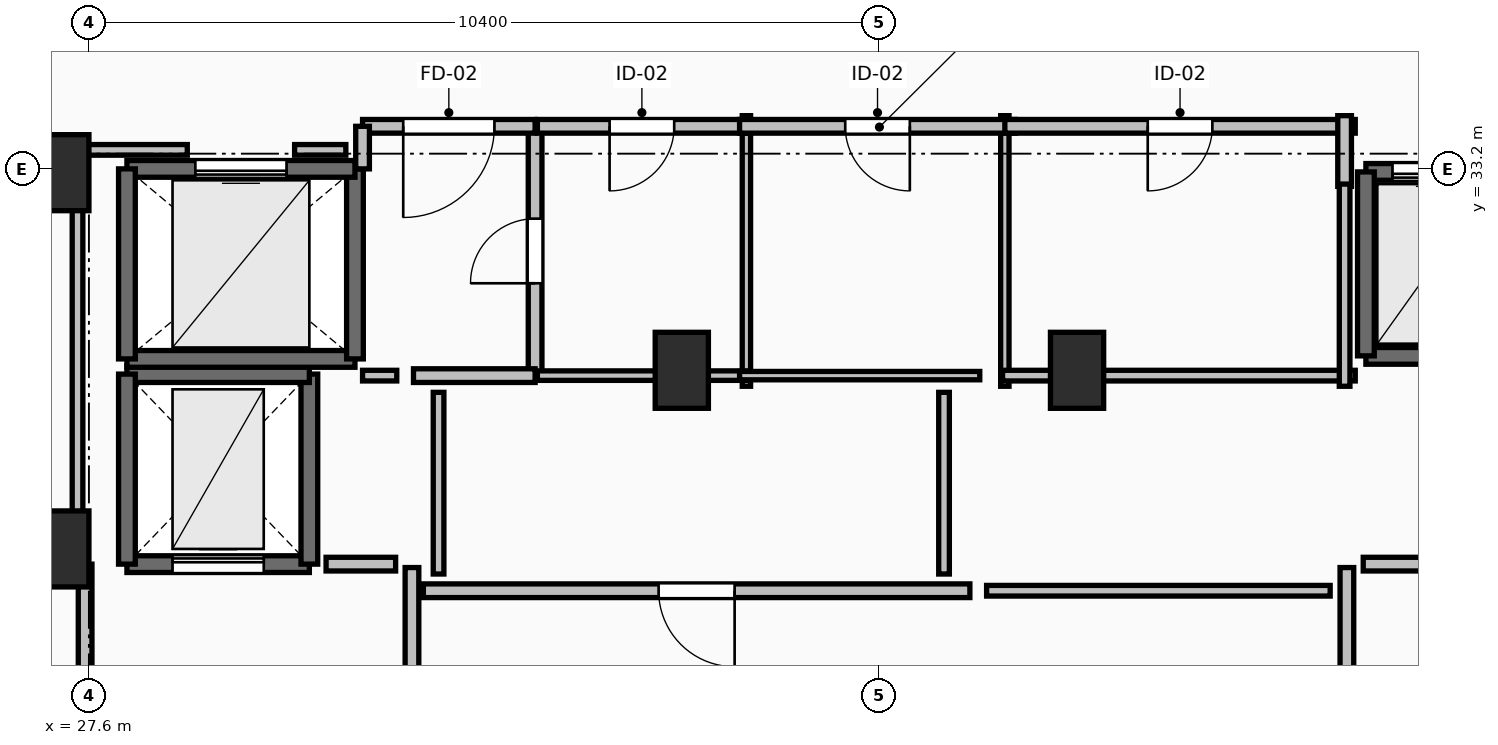
"""IFC4 building model, lengths in metres.
Left out: names, types, materials, properties, quantities, classifications, styles, units other than length and angle.
Written with IfcOpenShell. Run it as: python <this file> out.ifc"""

import sys

from ifc_helpers import new_model, si_unit, direction, frame, frame_2d, origin, origin_2d, place, context, subcontext, project, spatial, rectangle, extrude, element, fill, save


model = new_model("IFC4")
c1 = context("Model", 3, precision=1e-05, world=origin(), true_north=direction((0.0, 1.0)))
c2 = subcontext(c1, "Body", "Model", "MODEL_VIEW")
j1 = project(units=[si_unit("LENGTHUNIT", "METRE"), si_unit("PLANEANGLEUNIT", "RADIAN")], contexts=[c1])
p1 = place(None, origin())
s1 = spatial("IfcSite", under=j1, at=p1, CompositionType="ELEMENT")
p2 = place(p1, origin())
s2 = spatial("IfcBuilding", under=s1, at=p2, CompositionType="ELEMENT")
p3 = place(p2, frame((0.0, 0.0, 285.4)))
s3 = spatial("IfcBuildingStorey", under=s2, at=p3, CompositionType="ELEMENT", Elevation=285.4)
for number, where, z_axis, x_axis in (
    (1, (27.25, 28.2, 0.0), (0.0, 0.0, 1.0), (1.0, 0.0, 0.0)),
    (2, (27.25, 33.15, 0.0), (0.0, 0.0, 1.0), (1.0, 0.0, 0.0)),
    (3, (35.4, 30.55, 0.0), (0.0, 0.0, 1.0), (1.0, 0.0, 0.0)),
    (4, (40.6, 30.55, 0.0), (0.0, 0.0, 1.0), (1.0, 0.0, 0.0)),
):
    element("IfcColumn", number, at=place(p3, frame(where, z_axis=z_axis, x_axis=x_axis)), inside=s3, PredefinedType="PILASTER", context=c2, shape_type="SweptSolid", body=[
        extrude(rectangle(XDim=0.7, YDim=1.0, at=origin_2d()), origin(), (0.0, 0.0, 1.0), 5.0),
    ])
p4 = place(p3, frame((44.4, 30.74, 0.0), z_axis=(0.0, 0.0, 1.0), x_axis=(1.0, 0.0, 0.0)))
e5 = element("IfcWall", 5, at=p4, inside=s3, PredefinedType="SOLIDWALL", context=c2, shape_type="SweptSolid", body=[
    extrude(rectangle(XDim=1.8, YDim=0.22, at=frame_2d((0.9, 0.0))), origin(), (0.0, 0.0, 1.0), 4.69),
])
p5 = place(p3, frame((46.2, 33.16, 0.0), z_axis=(0.0, 0.0, 1.0), x_axis=(-1.0, 0.0, 0.0)))
e6 = element("IfcWall", 6, at=p5, inside=s3, PredefinedType="SOLIDWALL", context=c2, shape_type="SweptSolid", body=[
    extrude(rectangle(XDim=1.8, YDim=0.22, at=frame_2d((0.9, 0.0))), origin(), (0.0, 0.0, 1.0), 4.69),
])
p6 = place(p5, frame((0.35, 0.0, 0.0)))
e7 = element("IfcOpeningElement", 7, at=p6, cuts=e6, PredefinedType="OPENING", context=c2, shape_type="SweptSolid", body=[
    extrude(rectangle(XDim=1.1, YDim=2.2, at=frame_2d((0.55, 1.1))), frame((0.0, 0.125, 0.0), z_axis=(0.0, -1.0, 0.0), x_axis=(1.0, 0.0, 0.0)), (0.0, 0.0, 1.0), 0.25),
])
p7 = place(p3, frame((44.4, 33.16, 0.0), z_axis=(0.0, 0.0, 1.0), x_axis=(0.0, -1.0, 0.0)))
e8 = element("IfcWall", 8, at=p7, inside=s3, PredefinedType="SOLIDWALL", context=c2, shape_type="SweptSolid", body=[
    extrude(rectangle(XDim=2.42, YDim=0.22, at=frame_2d((1.21, 0.0))), origin(), (0.0, 0.0, 1.0), 4.69),
])
p8 = place(p3, frame((28.1, 28.0, 0.0), z_axis=(0.0, 0.0, 1.0), x_axis=(1.0, 0.0, 0.0)))
e9 = element("IfcWall", 9, at=p8, inside=s3, PredefinedType="SHEAR", context=c2, shape_type="SweptSolid", body=[
    extrude(rectangle(XDim=2.4, YDim=0.22, at=frame_2d((1.2, 0.0))), origin(), (0.0, 0.0, 1.0), 4.69),
])
p9 = place(p8, frame((0.6, 0.0, 0.0)))
e10 = element("IfcOpeningElement", 10, at=p9, cuts=e9, PredefinedType="OPENING", context=c2, shape_type="SweptSolid", body=[
    extrude(rectangle(XDim=1.2, YDim=2.2, at=frame_2d((0.6, 1.1))), frame((0.0, 0.125, 0.0), z_axis=(0.0, -1.0, 0.0), x_axis=(1.0, 0.0, 0.0)), (0.0, 0.0, 1.0), 0.25),
])
p10 = place(p3, frame((30.5, 28.0, 0.0), z_axis=(0.0, 0.0, 1.0), x_axis=(0.0, 1.0, 0.0)))
e11 = element("IfcWall", 11, at=p10, inside=s3, PredefinedType="SHEAR", context=c2, shape_type="SweptSolid", body=[
    extrude(rectangle(XDim=2.5, YDim=0.22, at=frame_2d((1.25, 0.0))), origin(), (0.0, 0.0, 1.0), 4.69),
])
p11 = place(p3, frame((30.5, 30.5, 0.0), z_axis=(0.0, 0.0, 1.0), x_axis=(-1.0, 0.0, 0.0)))
e12 = element("IfcWall", 12, at=p11, inside=s3, PredefinedType="SHEAR", context=c2, shape_type="SweptSolid", body=[
    extrude(rectangle(XDim=2.4, YDim=0.22, at=frame_2d((1.2, 0.0))), origin(), (0.0, 0.0, 1.0), 4.69),
])
p12 = place(p3, frame((28.1, 30.5, 0.0), z_axis=(0.0, 0.0, 1.0), x_axis=(0.0, -1.0, 0.0)))
e13 = element("IfcWall", 13, at=p12, inside=s3, PredefinedType="SHEAR", context=c2, shape_type="SweptSolid", body=[
    extrude(rectangle(XDim=2.5, YDim=0.22, at=frame_2d((1.25, 0.0))), origin(), (0.0, 0.0, 1.0), 4.69),
])
p13 = place(p3, frame((28.1, 30.7, 0.0), z_axis=(0.0, 0.0, 1.0), x_axis=(1.0, 0.0, 0.0)))
e14 = element("IfcWall", 14, at=p13, inside=s3, PredefinedType="SOLIDWALL", context=c2, shape_type="SweptSolid", body=[
    extrude(rectangle(XDim=3.0, YDim=0.22, at=frame_2d((1.5, 0.0))), origin(), (0.0, 0.0, 1.0), 4.69),
])
p14 = place(p3, frame((31.1, 30.7, 0.0), z_axis=(0.0, 0.0, 1.0), x_axis=(0.0, 1.0, 0.0)))
e15 = element("IfcWall", 15, at=p14, inside=s3, PredefinedType="SOLIDWALL", context=c2, shape_type="SweptSolid", body=[
    extrude(rectangle(XDim=2.5, YDim=0.22, at=frame_2d((1.25, 0.0))), origin(), (0.0, 0.0, 1.0), 4.69),
])
p15 = place(p3, frame((31.1, 33.2, 0.0), z_axis=(0.0, 0.0, 1.0), x_axis=(-1.0, 0.0, 0.0)))
e16 = element("IfcWall", 16, at=p15, inside=s3, PredefinedType="SOLIDWALL", context=c2, shape_type="SweptSolid", body=[
    extrude(rectangle(XDim=3.0, YDim=0.22, at=frame_2d((1.5, 0.0))), origin(), (0.0, 0.0, 1.0), 4.69),
])
p16 = place(p15, frame((0.9, 0.0, 0.0)))
e17 = element("IfcOpeningElement", 17, at=p16, cuts=e16, PredefinedType="OPENING", context=c2, shape_type="SweptSolid", body=[
    extrude(rectangle(XDim=1.2, YDim=2.2, at=frame_2d((0.6, 1.1))), frame((0.0, 0.125, 0.0), z_axis=(0.0, -1.0, 0.0), x_axis=(1.0, 0.0, 0.0)), (0.0, 0.0, 1.0), 0.25),
])
p17 = place(p3, frame((28.1, 33.2, 0.0), z_axis=(0.0, 0.0, 1.0), x_axis=(0.0, -1.0, 0.0)))
e18 = element("IfcWall", 18, at=p17, inside=s3, PredefinedType="SOLIDWALL", context=c2, shape_type="SweptSolid", body=[
    extrude(rectangle(XDim=2.5, YDim=0.22, at=frame_2d((1.25, 0.0))), origin(), (0.0, 0.0, 1.0), 4.69),
])
p18 = place(p3, frame((31.85, 24.045, 0.0), z_axis=(0.0, 0.0, 1.0), x_axis=(0.0, 1.0, 0.0)))
e19 = element("IfcWall", 19, at=p18, inside=s3, PredefinedType="PARTITIONING", context=c2, shape_type="SweptSolid", body=[
    extrude(rectangle(XDim=3.91, YDim=0.18, at=frame_2d((1.955, 0.0))), origin(), (0.0, 0.0, 1.0), 4.69),
])
p19 = place(p18, frame((1.355, 0.0, 0.0)))
e20 = element("IfcOpeningElement", 20, at=p19, cuts=e19, PredefinedType="OPENING", context=c2, shape_type="SweptSolid", body=[
    extrude(rectangle(XDim=1.2, YDim=2.15, at=frame_2d((0.6, 1.075))), frame((0.0, 0.105, 0.0), z_axis=(0.0, -1.0, 0.0), x_axis=(1.0, 0.0, 0.0)), (0.0, 0.0, 1.0), 0.21),
])
p20 = place(p3, frame((27.55, 28.0, 0.0), z_axis=(0.0, 0.0, 1.0), x_axis=(0.0, -1.0, 0.0)))
e21 = element("IfcWall", 21, at=p20, inside=s3, PredefinedType="PARTITIONING", context=c2, shape_type="SweptSolid", body=[
    extrude(rectangle(XDim=4.05, YDim=0.18, at=frame_2d((2.025, 0.0))), origin(), (0.0, 0.0, 1.0), 4.69),
])
p21 = place(p20, frame((1.425, 0.0, 0.0)))
e22 = element("IfcOpeningElement", 22, at=p21, cuts=e21, PredefinedType="OPENING", context=c2, shape_type="SweptSolid", body=[
    extrude(rectangle(XDim=1.2, YDim=2.15, at=frame_2d((0.6, 1.075))), frame((0.0, 0.105, 0.0), z_axis=(0.0, -1.0, 0.0), x_axis=(1.0, 0.0, 0.0)), (0.0, 0.0, 1.0), 0.21),
])
p22 = place(p3, frame((44.15, 27.955, 0.0), z_axis=(0.0, 0.0, 1.0), x_axis=(0.0, -1.0, 0.0)))
e23 = element("IfcWall", 23, at=p22, inside=s3, PredefinedType="PARTITIONING", context=c2, shape_type="SweptSolid", body=[
    extrude(rectangle(XDim=3.91, YDim=0.18, at=frame_2d((1.955, 0.0))), origin(), (0.0, 0.0, 1.0), 4.69),
])
p23 = place(p22, frame((1.355, 0.0, 0.0)))
e24 = element("IfcOpeningElement", 24, at=p23, cuts=e23, PredefinedType="OPENING", context=c2, shape_type="SweptSolid", body=[
    extrude(rectangle(XDim=1.2, YDim=2.15, at=frame_2d((0.6, 1.075))), frame((0.0, 0.105, 0.0), z_axis=(0.0, -1.0, 0.0), x_axis=(1.0, 0.0, 0.0)), (0.0, 0.0, 1.0), 0.21),
])
p24 = place(p3, frame((33.47, 30.48, 0.0), z_axis=(0.0, 0.0, 1.0), x_axis=(0.0, 1.0, 0.0)))
e25 = element("IfcWall", 25, at=p24, inside=s3, PredefinedType="PARTITIONING", context=c2, shape_type="SweptSolid", body=[
    extrude(rectangle(XDim=3.28, YDim=0.18, at=frame_2d((1.64, 0.0))), origin(), (0.0, 0.0, 1.0), 4.69),
])
p25 = place(p24, frame((1.215, 0.0, 0.0)))
e26 = element("IfcOpeningElement", 26, at=p25, cuts=e25, PredefinedType="OPENING", context=c2, shape_type="SweptSolid", body=[
    extrude(rectangle(XDim=0.85, YDim=2.1, at=frame_2d((0.425, 1.05))), frame((0.0, 0.105, 0.0), z_axis=(0.0, -1.0, 0.0), x_axis=(1.0, 0.0, 0.0)), (0.0, 0.0, 1.0), 0.21),
])
p26 = place(p3, frame((31.87, 30.48, 0.0), z_axis=(0.0, 0.0, 1.0), x_axis=(1.0, 0.0, 0.0)))
e27 = element("IfcWall", 27, at=p26, inside=s3, PredefinedType="PARTITIONING", context=c2, shape_type="SweptSolid", body=[
    extrude(rectangle(XDim=1.6, YDim=0.18, at=frame_2d((0.8, 0.0))), origin(), (0.0, 0.0, 1.0), 4.69),
])
p27 = place(p3, frame((33.47, 33.76, 0.0), z_axis=(0.0, 0.0, 1.0), x_axis=(-1.0, 0.0, 0.0)))
e28 = element("IfcWall", 28, at=p27, inside=s3, PredefinedType="PARTITIONING", context=c2, shape_type="SweptSolid", body=[
    extrude(rectangle(XDim=2.27, YDim=0.18, at=frame_2d((1.135, 0.0))), origin(), (0.0, 0.0, 1.0), 4.69),
])
p28 = place(p27, frame((0.535, 0.0, 0.0)))
e29 = element("IfcOpeningElement", 29, at=p28, cuts=e28, PredefinedType="OPENING", context=c2, shape_type="SweptSolid", body=[
    extrude(rectangle(XDim=1.2, YDim=2.15, at=frame_2d((0.6, 1.075))), frame((0.0, 0.105, 0.0), z_axis=(0.0, -1.0, 0.0), x_axis=(1.0, 0.0, 0.0)), (0.0, 0.0, 1.0), 0.21),
])
p29 = place(p3, frame((31.2, 33.76, 0.0), z_axis=(0.0, 0.0, 1.0), x_axis=(0.0, -1.0, 0.0)))
e30 = element("IfcWall", 30, at=p29, inside=s3, PredefinedType="PARTITIONING", context=c2, shape_type="SweptSolid", body=[
    extrude(rectangle(XDim=0.56, YDim=0.18, at=frame_2d((0.28, 0.0))), origin(), (0.0, 0.0, 1.0), 4.69),
])
p30 = place(p3, frame((39.19, 27.65, 0.0), z_axis=(0.0, 0.0, 1.0), x_axis=(-1.0, 0.0, 0.0)))
e31 = element("IfcWall", 31, at=p30, inside=s3, PredefinedType="PARTITIONING", context=c2, shape_type="SweptSolid", body=[
    extrude(rectangle(XDim=7.19, YDim=0.18, at=frame_2d((3.595, 0.0))), origin(), (0.0, 0.0, 1.0), 4.69),
])
p31 = place(p30, frame((3.095, 0.0, 0.0)))
e32 = element("IfcOpeningElement", 32, at=p31, cuts=e31, PredefinedType="OPENING", context=c2, shape_type="SweptSolid", body=[
    extrude(rectangle(XDim=1.0, YDim=2.15, at=frame_2d((0.5, 1.075))), frame((0.0, 0.105, 0.0), z_axis=(0.0, -1.0, 0.0), x_axis=(1.0, 0.0, 0.0)), (0.0, 0.0, 1.0), 0.21),
])
p32 = place(p3, frame((36.25, 30.34, 0.0), z_axis=(0.0, 0.0, 1.0), x_axis=(0.0, 1.0, 0.0)))
e33 = element("IfcWall", 33, at=p32, inside=s3, PredefinedType="PARTITIONING", context=c2, shape_type="SweptSolid", body=[
    extrude(rectangle(XDim=3.56, YDim=0.11, at=frame_2d((1.78, 0.0))), origin(), (0.0, 0.0, 1.0), 3.882),
])
p33 = place(p3, frame((33.5, 30.48, 0.0), z_axis=(0.0, 0.0, 1.0), x_axis=(1.0, 0.0, 0.0)))
e34 = element("IfcWall", 34, at=p33, inside=s3, PredefinedType="PARTITIONING", context=c2, shape_type="SweptSolid", body=[
    extrude(rectangle(XDim=2.75, YDim=0.125, at=frame_2d((1.375, 0.0))), origin(), (0.0, 0.0, 1.0), 3.882),
])
p34 = place(p3, frame((36.25, 33.76, 0.0), z_axis=(0.0, 0.0, 1.0), x_axis=(-1.0, 0.0, 0.0)))
e35 = element("IfcWall", 35, at=p34, inside=s3, PredefinedType="PARTITIONING", context=c2, shape_type="SweptSolid", body=[
    extrude(rectangle(XDim=2.75, YDim=0.18, at=frame_2d((1.375, 0.0))), origin(), (0.0, 0.0, 1.0), 4.69),
])
p35 = place(p34, frame((0.95, 0.0, 0.0)))
e36 = element("IfcOpeningElement", 36, at=p35, cuts=e35, PredefinedType="OPENING", context=c2, shape_type="SweptSolid", body=[
    extrude(rectangle(XDim=0.85, YDim=2.1, at=frame_2d((0.425, 1.05))), frame((0.0, 0.105, 0.0), z_axis=(0.0, -1.0, 0.0), x_axis=(1.0, 0.0, 0.0)), (0.0, 0.0, 1.0), 0.21),
])
p36 = place(p3, frame((39.65, 30.34, 0.0), z_axis=(0.0, 0.0, 1.0), x_axis=(0.0, 1.0, 0.0)))
e37 = element("IfcWall", 37, at=p36, inside=s3, PredefinedType="PARTITIONING", context=c2, shape_type="SweptSolid", body=[
    extrude(rectangle(XDim=3.56, YDim=0.11, at=frame_2d((1.78, 0.0))), origin(), (0.0, 0.0, 1.0), 3.882),
])
p37 = place(p3, frame((36.16, 30.48, 0.0), z_axis=(0.0, 0.0, 1.0), x_axis=(1.0, 0.0, 0.0)))
e38 = element("IfcWall", 38, at=p37, inside=s3, PredefinedType="PARTITIONING", context=c2, shape_type="SweptSolid", body=[
    extrude(rectangle(XDim=3.16, YDim=0.11, at=frame_2d((1.58, 0.0))), origin(), (0.0, 0.0, 1.0), 3.882),
])
p38 = place(p3, frame((39.79, 33.76, 0.0), z_axis=(0.0, 0.0, 1.0), x_axis=(-1.0, 0.0, 0.0)))
e39 = element("IfcWall", 39, at=p38, inside=s3, PredefinedType="PARTITIONING", context=c2, shape_type="SweptSolid", body=[
    extrude(rectangle(XDim=3.63, YDim=0.18, at=frame_2d((1.815, 0.0))), origin(), (0.0, 0.0, 1.0), 4.69),
])
p39 = place(p38, frame((1.39, 0.0, 0.0)))
e40 = element("IfcOpeningElement", 40, at=p39, cuts=e39, PredefinedType="OPENING", context=c2, shape_type="SweptSolid", body=[
    extrude(rectangle(XDim=0.85, YDim=2.1, at=frame_2d((0.425, 1.05))), frame((0.0, 0.105, 0.0), z_axis=(0.0, -1.0, 0.0), x_axis=(1.0, 0.0, 0.0)), (0.0, 0.0, 1.0), 0.21),
])
p40 = place(p3, frame((44.26, 33.76, 0.0), z_axis=(0.0, 0.0, 1.0), x_axis=(-1.0, 0.0, 0.0)))
e41 = element("IfcWall", 41, at=p40, inside=s3, PredefinedType="PARTITIONING", context=c2, shape_type="SweptSolid", body=[
    extrude(rectangle(XDim=4.61, YDim=0.18, at=frame_2d((2.305, 0.0))), origin(), (0.0, 0.0, 1.0), 4.69),
])
p41 = place(p40, frame((1.88, 0.0, 0.0)))
e42 = element("IfcOpeningElement", 42, at=p41, cuts=e41, PredefinedType="OPENING", context=c2, shape_type="SweptSolid", body=[
    extrude(rectangle(XDim=0.85, YDim=2.1, at=frame_2d((0.425, 1.05))), frame((0.0, 0.105, 0.0), z_axis=(0.0, -1.0, 0.0), x_axis=(1.0, 0.0, 0.0)), (0.0, 0.0, 1.0), 0.21),
])
p42 = place(p3, frame((44.12, 32.97, 0.0), z_axis=(0.0, 0.0, 1.0), x_axis=(0.0, 1.0, 0.0)))
e43 = element("IfcWall", 43, at=p42, inside=s3, PredefinedType="PARTITIONING", context=c2, shape_type="SweptSolid", body=[
    extrude(rectangle(XDim=0.93, YDim=0.18, at=frame_2d((0.465, 0.0))), origin(), (0.0, 0.0, 1.0), 4.69),
])
for number, where, z_axis, x_axis in (
    (44, (31.635, 28.0, 0.0), (0.0, 0.0, 1.0), (-1.0, 0.0, 0.0)),
    (45, (45.28, 28.0, 0.0), (0.0, 0.0, 1.0), (-1.0, 0.0, 0.0)),
):
    element("IfcWall", number, at=place(p3, frame(where, z_axis=z_axis, x_axis=x_axis)), inside=s3, PredefinedType="PARTITIONING", context=c2, shape_type="SweptSolid", body=[
        extrude(rectangle(XDim=0.915, YDim=0.18, at=frame_2d((0.458, 0.0))), origin(), (0.0, 0.0, 1.0), 4.69),
    ])
p43 = place(p3, frame((31.2, 30.48, 0.0), z_axis=(0.0, 0.0, 1.0), x_axis=(1.0, 0.0, 0.0)))
e46 = element("IfcWall", 46, at=p43, inside=s3, PredefinedType="PARTITIONING", context=c2, shape_type="SweptSolid", body=[
    extrude(rectangle(XDim=0.45, YDim=0.14, at=frame_2d((0.225, 0.0))), origin(), (0.0, 0.0, 1.0), 4.69),
])
p44 = place(p3, frame((43.93, 27.65, 0.0), z_axis=(0.0, 0.0, 1.0), x_axis=(-1.0, 0.0, 0.0)))
e47 = element("IfcWall", 47, at=p44, inside=s3, PredefinedType="PARTITIONING", context=c2, shape_type="SweptSolid", body=[
    extrude(rectangle(XDim=4.52, YDim=0.14, at=frame_2d((2.26, 0.0))), origin(), (0.0, 0.0, 1.0), 4.69),
])
p45 = place(p3, frame((39.62, 30.48, 0.0), z_axis=(0.0, 0.0, 1.0), x_axis=(1.0, 0.0, 0.0)))
e48 = element("IfcWall", 48, at=p45, inside=s3, PredefinedType="PARTITIONING", context=c2, shape_type="SweptSolid", body=[
    extrude(rectangle(XDim=4.64, YDim=0.14, at=frame_2d((2.32, 0.0))), origin(), (0.0, 0.0, 1.0), 3.882),
])
p46 = place(p3, frame((44.12, 30.34, 0.0), z_axis=(0.0, 0.0, 1.0), x_axis=(0.0, 1.0, 0.0)))
e49 = element("IfcWall", 49, at=p46, inside=s3, PredefinedType="PARTITIONING", context=c2, shape_type="SweptSolid", body=[
    extrude(rectangle(XDim=2.66, YDim=0.14, at=frame_2d((1.33, 0.0))), origin(), (0.0, 0.0, 1.0), 4.69),
])
for number, where, z_axis, x_axis in (
    (50, (32.2, 30.26, 0.0), (0.0, 0.0, 1.0), (0.0, -1.0, 0.0)),
    (51, (38.85, 27.87, 0.0), (0.0, 0.0, 1.0), (0.0, 1.0, 0.0)),
):
    element("IfcWall", number, at=place(p3, frame(where, z_axis=z_axis, x_axis=x_axis)), inside=s3, PredefinedType="PARTITIONING", context=c2, shape_type="SweptSolid", body=[
        extrude(rectangle(XDim=2.39, YDim=0.14, at=frame_2d((1.195, 0.0))), origin(), (0.0, 0.0, 1.0), 4.69),
    ])
p47 = place(p3, frame((30.98, 33.45, 0.0), z_axis=(0.0, 0.0, 1.0), x_axis=(-1.0, 0.0, 0.0)))
e52 = element("IfcWall", 52, at=p47, inside=s3, PredefinedType="PARTITIONING", context=c2, shape_type="SweptSolid", body=[
    extrude(rectangle(XDim=0.674, YDim=0.14, at=frame_2d((0.337, 0.0))), origin(), (0.0, 0.0, 1.0), 4.69),
])
p48 = place(p3, frame((28.894, 33.45, 0.0), z_axis=(0.0, 0.0, 1.0), x_axis=(-1.0, 0.0, 0.0)))
e53 = element("IfcWall", 53, at=p48, inside=s3, PredefinedType="PARTITIONING", context=c2, shape_type="SweptSolid", body=[
    extrude(rectangle(XDim=1.444, YDim=0.14, at=frame_2d((0.722, 0.0))), origin(), (0.0, 0.0, 1.0), 3.882),
])
p49 = place(p3, frame((27.45, 33.45, 0.0), z_axis=(0.0, 0.0, 1.0), x_axis=(0.0, -1.0, 0.0)))
e54 = element("IfcWall", 54, at=p49, inside=s3, PredefinedType="PARTITIONING", context=c2, shape_type="SweptSolid", body=[
    extrude(rectangle(XDim=5.254, YDim=0.14, at=frame_2d((2.627, 0.0))), origin(), (0.0, 0.0, 1.0), 3.882),
])
p50 = place(p6, origin())
e55 = element("IfcDoor", 55, at=p50, inside=s3, OperationType="SLIDING_TO_LEFT", PredefinedType="DOOR", context=c2, shape_type="SweptSolid", body=[
    extrude(rectangle(XDim=1.1, YDim=2.2, at=frame_2d((0.55, 1.1))), frame((0.0, 0.025, 0.0), z_axis=(0.0, -1.0, 0.0), x_axis=(1.0, 0.0, 0.0)), (0.0, 0.0, 1.0), 0.05),
])
fill(e7, e55)
p51 = place(p9, origin())
e56 = element("IfcDoor", 56, at=p51, inside=s3, OperationType="SLIDING_TO_LEFT", PredefinedType="DOOR", context=c2, shape_type="SweptSolid", body=[
    extrude(rectangle(XDim=1.2, YDim=2.2, at=frame_2d((0.6, 1.1))), frame((0.0, 0.025, 0.0), z_axis=(0.0, -1.0, 0.0), x_axis=(1.0, 0.0, 0.0)), (0.0, 0.0, 1.0), 0.05),
])
fill(e10, e56)
p52 = place(p16, origin())
e57 = element("IfcDoor", 57, at=p52, inside=s3, OperationType="SLIDING_TO_LEFT", PredefinedType="DOOR", context=c2, shape_type="SweptSolid", body=[
    extrude(rectangle(XDim=1.2, YDim=2.2, at=frame_2d((0.6, 1.1))), frame((0.0, 0.025, 0.0), z_axis=(0.0, -1.0, 0.0), x_axis=(1.0, 0.0, 0.0)), (0.0, 0.0, 1.0), 0.05),
])
fill(e17, e57)
p53 = place(p25, origin())
e58 = element("IfcDoor", 58, at=p53, inside=s3, OperationType="SINGLE_SWING_LEFT", PredefinedType="DOOR", context=c2, shape_type="SweptSolid", body=[
    extrude(rectangle(XDim=0.85, YDim=2.1, at=frame_2d((0.425, 1.05))), frame((0.0, 0.025, 0.0), z_axis=(0.0, -1.0, 0.0), x_axis=(1.0, 0.0, 0.0)), (0.0, 0.0, 1.0), 0.05),
])
fill(e26, e58)
p54 = place(p28, origin())
e59 = element("IfcDoor", 59, at=p54, inside=s3, OperationType="SINGLE_SWING_RIGHT", PredefinedType="DOOR", context=c2, shape_type="SweptSolid", body=[
    extrude(rectangle(XDim=1.2, YDim=2.15, at=frame_2d((0.6, 1.075))), frame((0.0, 0.025, 0.0), z_axis=(0.0, -1.0, 0.0), x_axis=(1.0, 0.0, 0.0)), (0.0, 0.0, 1.0), 0.05),
])
fill(e29, e59)
p55 = place(p31, origin())
e60 = element("IfcDoor", 60, at=p55, inside=s3, OperationType="SINGLE_SWING_LEFT", PredefinedType="DOOR", context=c2, shape_type="SweptSolid", body=[
    extrude(rectangle(XDim=1.0, YDim=2.15, at=frame_2d((0.5, 1.075))), frame((0.0, 0.025, 0.0), z_axis=(0.0, -1.0, 0.0), x_axis=(1.0, 0.0, 0.0)), (0.0, 0.0, 1.0), 0.05),
])
fill(e32, e60)
p56 = place(p35, origin())
e61 = element("IfcDoor", 61, at=p56, inside=s3, OperationType="SINGLE_SWING_RIGHT", PredefinedType="DOOR", context=c2, shape_type="SweptSolid", body=[
    extrude(rectangle(XDim=0.85, YDim=2.1, at=frame_2d((0.425, 1.05))), frame((0.0, 0.025, 0.0), z_axis=(0.0, -1.0, 0.0), x_axis=(1.0, 0.0, 0.0)), (0.0, 0.0, 1.0), 0.05),
])
fill(e36, e61)
p57 = place(p39, origin())
e62 = element("IfcDoor", 62, at=p57, inside=s3, OperationType="SINGLE_SWING_LEFT", PredefinedType="DOOR", context=c2, shape_type="SweptSolid", body=[
    extrude(rectangle(XDim=0.85, YDim=2.1, at=frame_2d((0.425, 1.05))), frame((0.0, 0.025, 0.0), z_axis=(0.0, -1.0, 0.0), x_axis=(1.0, 0.0, 0.0)), (0.0, 0.0, 1.0), 0.05),
])
fill(e40, e62)
p58 = place(p41, origin())
e63 = element("IfcDoor", 63, at=p58, inside=s3, OperationType="SINGLE_SWING_RIGHT", PredefinedType="DOOR", context=c2, shape_type="SweptSolid", body=[
    extrude(rectangle(XDim=0.85, YDim=2.1, at=frame_2d((0.425, 1.05))), frame((0.0, 0.025, 0.0), z_axis=(0.0, -1.0, 0.0), x_axis=(1.0, 0.0, 0.0)), (0.0, 0.0, 1.0), 0.05),
])
fill(e42, e63)
save(model, sys.argv[1])
